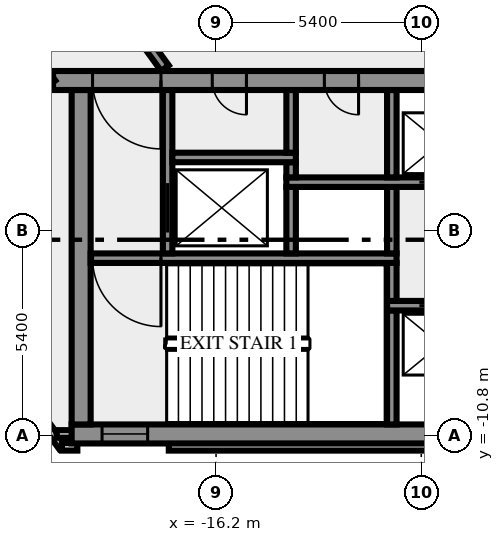
"""IFC4 building model, lengths in metres.
Left out: names, types, materials, properties, quantities, classifications, styles, units other than length and angle.
Written with IfcOpenShell. Run it as: python <this file> out.ifc"""

import sys

from ifc_helpers import new_model, si_unit, direction, frame, frame_2d, origin, place, context, subcontext, project, spatial, rectangle, extrude, element, fill, save


model = new_model("IFC4")
c1 = context("Model", 3, precision=1e-05, world=origin(), true_north=direction((0.0, 1.0)))
c2 = subcontext(c1, "Body", "Model", "MODEL_VIEW")
j1 = project(units=[si_unit("LENGTHUNIT", "METRE"), si_unit("PLANEANGLEUNIT", "RADIAN")], contexts=[c1])
p1 = place(None, origin())
s1 = spatial("IfcSite", under=j1, at=p1, CompositionType="ELEMENT")
p2 = place(p1, origin())
s2 = spatial("IfcBuilding", under=s1, at=p2, CompositionType="ELEMENT")
p3 = place(p2, frame((0.0, 0.0, 129.0)))
s3 = spatial("IfcBuildingStorey", under=s2, at=p3, CompositionType="ELEMENT", Elevation=129.0)
p4 = place(p3, frame((-21.833, -8.909, 0.0), z_axis=(0.0, 0.0, 1.0), x_axis=(0.587766567315, -0.809030569476, 0.0)))
e1 = element("IfcWall", 1, at=p4, inside=s3, PredefinedType="SOLIDWALL", context=c2, shape_type="SweptSolid", body=[
    extrude(rectangle(XDim=2.688, YDim=0.2, at=frame_2d((1.344, 0.0))), origin(), (0.0, 0.0, 1.0), 3.4),
])
p5 = place(p3, frame((-20.256, -11.088, 0.0), z_axis=(0.0, 0.0, 1.0), x_axis=(1.0, 0.0, 0.0)))
e2 = element("IfcWall", 2, at=p5, inside=s3, PredefinedType="SOLIDWALL", context=c2, shape_type="SweptSolid", body=[
    extrude(rectangle(XDim=0.406, YDim=0.2, at=frame_2d((0.203, 0.0))), origin(), (0.0, 0.0, 1.0), 3.4),
])
p6 = place(p3, frame((-17.444, -11.088, 0.0), z_axis=(0.0, 0.0, 1.0), x_axis=(1.0, 0.0, 0.0)))
e3 = element("IfcWall", 3, at=p6, inside=s3, PredefinedType="SOLIDWALL", context=c2, shape_type="SweptSolid", body=[
    extrude(rectangle(XDim=34.888, YDim=0.2, at=frame_2d((17.444, 0.0))), origin(), (0.0, 0.0, 1.0), 3.4),
])
p7 = place(p3, frame((-19.98, -10.75, 0.0), z_axis=(0.0, 0.0, 1.0), x_axis=(-1.0, 0.0, 0.0)))
e4 = element("IfcWall", 4, at=p7, inside=s3, PredefinedType="SOLIDWALL", context=c2, shape_type="SweptSolid", body=[
    extrude(rectangle(XDim=0.417, YDim=0.2, at=frame_2d((0.208, 0.0))), origin(), (0.0, 0.0, 1.0), 3.4),
])
p8 = place(p3, frame((-20.0, -10.75, 0.0), z_axis=(0.0, 0.0, 1.0), x_axis=(1.0, 0.0, 0.0)))
e5 = element("IfcWall", 5, at=p8, inside=s3, PredefinedType="SHEAR", context=c2, shape_type="SweptSolid", body=[
    extrude(rectangle(XDim=40.0, YDim=0.5, at=frame_2d((20.0, 0.0))), origin(), (0.0, 0.0, 1.0), 3.4),
])
p9 = place(p8, frame((0.8, 0.0, 1.0)))
e6 = element("IfcOpeningElement", 6, at=p9, cuts=e5, PredefinedType="OPENING", context=c2, shape_type="SweptSolid", body=[
    extrude(rectangle(XDim=1.2, YDim=1.2, at=frame_2d((0.6, 0.6))), frame((0.0, 0.26, 0.0), z_axis=(0.0, -1.0, 0.0), x_axis=(1.0, 0.0, 0.0)), (0.0, 0.0, 1.0), 0.52),
])
p10 = place(p8, frame((38.0, 0.0, 1.0)))
e7 = element("IfcOpeningElement", 7, at=p10, cuts=e5, PredefinedType="OPENING", context=c2, shape_type="SweptSolid", body=[
    extrude(rectangle(XDim=1.2, YDim=1.2, at=frame_2d((0.6, 0.6))), frame((0.0, 0.26, 0.0), z_axis=(0.0, -1.0, 0.0), x_axis=(1.0, 0.0, 0.0)), (0.0, 0.0, 1.0), 0.52),
])
p11 = place(p3, frame((-19.75, -10.5, 0.0), z_axis=(0.0, 0.0, 1.0), x_axis=(0.0, 1.0, 0.0)))
e8 = element("IfcWall", 8, at=p11, inside=s3, PredefinedType="SHEAR", context=c2, shape_type="SweptSolid", body=[
    extrude(rectangle(XDim=8.8, YDim=0.5, at=frame_2d((4.4, 0.0))), origin(), (0.0, 0.0, 1.0), 3.4),
])
p12 = place(p3, frame((-11.575, -10.5, 0.0), z_axis=(0.0, 0.0, 1.0), x_axis=(0.0, 1.0, 0.0)))
e9 = element("IfcWall", 9, at=p12, inside=s3, PredefinedType="SHEAR", context=c2, shape_type="SweptSolid", body=[
    extrude(rectangle(XDim=3.0, YDim=0.25, at=frame_2d((1.5, 0.0))), origin(), (0.0, 0.0, 1.0), 3.4),
])
p13 = place(p3, frame((11.7, -7.375, 0.0), z_axis=(0.0, 0.0, 1.0), x_axis=(-1.0, 0.0, 0.0)))
e10 = element("IfcWall", 10, at=p13, inside=s3, PredefinedType="SHEAR", context=c2, shape_type="SweptSolid", body=[
    extrude(rectangle(XDim=23.4, YDim=0.25, at=frame_2d((11.7, 0.0))), origin(), (0.0, 0.0, 1.0), 3.4),
])
p14 = place(p13, frame((21.45, 0.0, 0.0)))
e11 = element("IfcOpeningElement", 11, at=p14, cuts=e10, PredefinedType="OPENING", context=c2, shape_type="SweptSolid", body=[
    extrude(rectangle(XDim=1.1, YDim=2.1, at=frame_2d((0.55, 1.05))), frame((0.0, 0.135, 0.0), z_axis=(0.0, -1.0, 0.0), x_axis=(1.0, 0.0, 0.0)), (0.0, 0.0, 1.0), 0.27),
])
p15 = place(p13, frame((18.95, 0.0, 0.0)))
e12 = element("IfcOpeningElement", 12, at=p15, cuts=e10, PredefinedType="OPENING", context=c2, shape_type="SweptSolid", body=[
    extrude(rectangle(XDim=1.1, YDim=2.1, at=frame_2d((0.55, 1.05))), frame((0.0, 0.135, 0.0), z_axis=(0.0, -1.0, 0.0), x_axis=(1.0, 0.0, 0.0)), (0.0, 0.0, 1.0), 0.27),
])
p16 = place(p13, frame((16.45, 0.0, 0.0)))
e13 = element("IfcOpeningElement", 13, at=p16, cuts=e10, PredefinedType="OPENING", context=c2, shape_type="SweptSolid", body=[
    extrude(rectangle(XDim=1.1, YDim=2.1, at=frame_2d((0.55, 1.05))), frame((0.0, 0.135, 0.0), z_axis=(0.0, -1.0, 0.0), x_axis=(1.0, 0.0, 0.0)), (0.0, 0.0, 1.0), 0.27),
])
p17 = place(p13, frame((14.75, 0.0, 0.0)))
e14 = element("IfcOpeningElement", 14, at=p17, cuts=e10, PredefinedType="OPENING", context=c2, shape_type="SweptSolid", body=[
    extrude(rectangle(XDim=0.7, YDim=2.1, at=frame_2d((0.35, 1.05))), frame((0.0, 0.135, 0.0), z_axis=(0.0, -1.0, 0.0), x_axis=(1.0, 0.0, 0.0)), (0.0, 0.0, 1.0), 0.27),
])
p18 = place(p13, frame((13.35, 0.0, 0.0)))
e15 = element("IfcOpeningElement", 15, at=p18, cuts=e10, PredefinedType="OPENING", context=c2, shape_type="SweptSolid", body=[
    extrude(rectangle(XDim=0.9, YDim=2.1, at=frame_2d((0.45, 1.05))), frame((0.0, 0.135, 0.0), z_axis=(0.0, -1.0, 0.0), x_axis=(1.0, 0.0, 0.0)), (0.0, 0.0, 1.0), 0.27),
])
p19 = place(p13, frame((11.975, 0.0, 0.0)))
e16 = element("IfcOpeningElement", 16, at=p19, cuts=e10, PredefinedType="OPENING", context=c2, shape_type="SweptSolid", body=[
    extrude(rectangle(XDim=0.9, YDim=2.1, at=frame_2d((0.45, 1.05))), frame((0.0, 0.135, 0.0), z_axis=(0.0, -1.0, 0.0), x_axis=(1.0, 0.0, 0.0)), (0.0, 0.0, 1.0), 0.27),
])
p20 = place(p13, frame((10.5, 0.0, 0.0)))
e17 = element("IfcOpeningElement", 17, at=p20, cuts=e10, PredefinedType="OPENING", context=c2, shape_type="SweptSolid", body=[
    extrude(rectangle(XDim=0.9, YDim=2.1, at=frame_2d((0.45, 1.05))), frame((0.0, 0.135, 0.0), z_axis=(0.0, -1.0, 0.0), x_axis=(1.0, 0.0, 0.0)), (0.0, 0.0, 1.0), 0.27),
])
p21 = place(p3, frame((-11.575, -7.25, 0.0), z_axis=(0.0, 0.0, 1.0), x_axis=(0.0, 1.0, 0.0)))
e18 = element("IfcWall", 18, at=p21, inside=s3, PredefinedType="SHEAR", context=c2, shape_type="SweptSolid", body=[
    extrude(rectangle(XDim=1.0, YDim=0.25, at=frame_2d((0.5, 0.0))), origin(), (0.0, 0.0, 1.0), 3.4),
])
p22 = place(p3, frame((-11.45, -6.125, 0.0), z_axis=(0.0, 0.0, 1.0), x_axis=(-1.0, 0.0, 0.0)))
e19 = element("IfcWall", 19, at=p22, inside=s3, PredefinedType="SHEAR", context=c2, shape_type="SweptSolid", body=[
    extrude(rectangle(XDim=8.05, YDim=0.25, at=frame_2d((4.025, 0.0))), origin(), (0.0, 0.0, 1.0), 3.4),
])
p23 = place(p22, frame((6.2, 0.0, 0.0)))
e20 = element("IfcOpeningElement", 20, at=p23, cuts=e19, PredefinedType="OPENING", context=c2, shape_type="SweptSolid", body=[
    extrude(rectangle(XDim=1.8, YDim=2.1, at=frame_2d((0.9, 1.05))), frame((0.0, 0.135, 0.0), z_axis=(0.0, -1.0, 0.0), x_axis=(1.0, 0.0, 0.0)), (0.0, 0.0, 1.0), 0.27),
])
p24 = place(p3, frame((-17.475, -6.0, 0.0), z_axis=(0.0, 0.0, 1.0), x_axis=(0.0, 1.0, 0.0)))
e21 = element("IfcWall", 21, at=p24, inside=s3, PredefinedType="SHEAR", context=c2, shape_type="SweptSolid", body=[
    extrude(rectangle(XDim=4.3, YDim=0.25, at=frame_2d((2.15, 0.0))), origin(), (0.0, 0.0, 1.0), 3.4),
])
p25 = place(p24, frame((0.55, 0.0, 0.0)))
e22 = element("IfcOpeningElement", 22, at=p25, cuts=e21, PredefinedType="OPENING", context=c2, shape_type="SweptSolid", body=[
    extrude(rectangle(XDim=1.3, YDim=2.1, at=frame_2d((0.65, 1.05))), frame((0.0, 0.135, 0.0), z_axis=(0.0, -1.0, 0.0), x_axis=(1.0, 0.0, 0.0)), (0.0, 0.0, 1.0), 0.27),
])
for number, where, z_axis, x_axis in (
    (23, (-14.225, -6.0, 0.0), (0.0, 0.0, 1.0), (0.0, 1.0, 0.0)),
    (24, (-11.575, -6.0, 0.0), (0.0, 0.0, 1.0), (0.0, 1.0, 0.0)),
):
    element("IfcWall", number, at=place(p3, frame(where, z_axis=z_axis, x_axis=x_axis)), inside=s3, PredefinedType="SHEAR", context=c2, shape_type="SweptSolid", body=[
        extrude(rectangle(XDim=1.75, YDim=0.25, at=frame_2d((0.875, 0.0))), origin(), (0.0, 0.0, 1.0), 3.4),
    ])
p26 = place(p3, frame((-14.35, -4.125, 0.0), z_axis=(0.0, 0.0, 1.0), x_axis=(1.0, 0.0, 0.0)))
e25 = element("IfcWall", 25, at=p26, inside=s3, PredefinedType="SHEAR", context=c2, shape_type="SweptSolid", body=[
    extrude(rectangle(XDim=12.7, YDim=0.25, at=frame_2d((6.35, 0.0))), origin(), (0.0, 0.0, 1.0), 3.4),
])
p27 = place(p26, frame((3.5, 0.0, 0.0)))
e26 = element("IfcOpeningElement", 26, at=p27, cuts=e25, PredefinedType="OPENING", context=c2, shape_type="SweptSolid", body=[
    extrude(rectangle(XDim=1.1, YDim=2.1, at=frame_2d((0.55, 1.05))), frame((0.0, 0.135, 0.0), z_axis=(0.0, -1.0, 0.0), x_axis=(1.0, 0.0, 0.0)), (0.0, 0.0, 1.0), 0.27),
])
p28 = place(p26, frame((6.0, 0.0, 0.0)))
e27 = element("IfcOpeningElement", 27, at=p28, cuts=e25, PredefinedType="OPENING", context=c2, shape_type="SweptSolid", body=[
    extrude(rectangle(XDim=1.1, YDim=2.1, at=frame_2d((0.55, 1.05))), frame((0.0, 0.135, 0.0), z_axis=(0.0, -1.0, 0.0), x_axis=(1.0, 0.0, 0.0)), (0.0, 0.0, 1.0), 0.27),
])
p29 = place(p26, frame((8.5, 0.0, 0.0)))
e28 = element("IfcOpeningElement", 28, at=p29, cuts=e25, PredefinedType="OPENING", context=c2, shape_type="SweptSolid", body=[
    extrude(rectangle(XDim=1.1, YDim=2.1, at=frame_2d((0.55, 1.05))), frame((0.0, 0.135, 0.0), z_axis=(0.0, -1.0, 0.0), x_axis=(1.0, 0.0, 0.0)), (0.0, 0.0, 1.0), 0.27),
])
p30 = place(p3, frame((-14.225, -4.0, 0.0), z_axis=(0.0, 0.0, 1.0), x_axis=(0.0, 1.0, 0.0)))
e29 = element("IfcWall", 29, at=p30, inside=s3, PredefinedType="SHEAR", context=c2, shape_type="SweptSolid", body=[
    extrude(rectangle(XDim=0.4, YDim=0.25, at=frame_2d((0.2, 0.0))), origin(), (0.0, 0.0, 1.0), 3.4),
])
p31 = place(p3, frame((-11.575, -4.0, 0.0), z_axis=(0.0, 0.0, 1.0), x_axis=(0.0, 1.0, 0.0)))
e30 = element("IfcWall", 30, at=p31, inside=s3, PredefinedType="SHEAR", context=c2, shape_type="SweptSolid", body=[
    extrude(rectangle(XDim=2.3, YDim=0.25, at=frame_2d((1.15, 0.0))), origin(), (0.0, 0.0, 1.0), 3.4),
])
p32 = place(p3, frame((-17.35, -3.475, 0.0), z_axis=(0.0, 0.0, 1.0), x_axis=(1.0, 0.0, 0.0)))
e31 = element("IfcWall", 31, at=p32, inside=s3, PredefinedType="SHEAR", context=c2, shape_type="SweptSolid", body=[
    extrude(rectangle(XDim=3.25, YDim=0.25, at=frame_2d((1.625, 0.0))), origin(), (0.0, 0.0, 1.0), 3.4),
])
p33 = place(p3, frame((-14.225, -3.35, 0.0), z_axis=(0.0, 0.0, 1.0), x_axis=(0.0, 1.0, 0.0)))
e32 = element("IfcWall", 32, at=p33, inside=s3, PredefinedType="SHEAR", context=c2, shape_type="SweptSolid", body=[
    extrude(rectangle(XDim=1.65, YDim=0.25, at=frame_2d((0.825, 0.0))), origin(), (0.0, 0.0, 1.0), 3.4),
])
p34 = place(p3, frame((20.49, -1.45, 0.0), z_axis=(0.0, 0.0, 1.0), x_axis=(-1.0, 0.0, 0.0)))
e33 = element("IfcWall", 33, at=p34, inside=s3, PredefinedType="SHEAR", context=c2, shape_type="SweptSolid", body=[
    extrude(rectangle(XDim=40.98, YDim=0.5, at=frame_2d((20.49, 0.0))), origin(), (0.0, 0.0, 1.0), 3.4),
])
p35 = place(p34, frame((38.14, 0.0, 0.0)))
e34 = element("IfcOpeningElement", 34, at=p35, cuts=e33, PredefinedType="OPENING", context=c2, shape_type="SweptSolid", body=[
    extrude(rectangle(XDim=1.8, YDim=2.1, at=frame_2d((0.9, 1.05))), frame((0.0, 0.26, 0.0), z_axis=(0.0, -1.0, 0.0), x_axis=(1.0, 0.0, 0.0)), (0.0, 0.0, 1.0), 0.52),
])
p36 = place(p34, frame((35.89, 0.0, 0.0)))
e35 = element("IfcOpeningElement", 35, at=p36, cuts=e33, PredefinedType="OPENING", context=c2, shape_type="SweptSolid", body=[
    extrude(rectangle(XDim=0.9, YDim=2.1, at=frame_2d((0.45, 1.05))), frame((0.0, 0.26, 0.0), z_axis=(0.0, -1.0, 0.0), x_axis=(1.0, 0.0, 0.0)), (0.0, 0.0, 1.0), 0.52),
])
p37 = place(p34, frame((32.94, 0.0, 0.0)))
e36 = element("IfcOpeningElement", 36, at=p37, cuts=e33, PredefinedType="OPENING", context=c2, shape_type="SweptSolid", body=[
    extrude(rectangle(XDim=0.9, YDim=2.1, at=frame_2d((0.45, 1.05))), frame((0.0, 0.26, 0.0), z_axis=(0.0, -1.0, 0.0), x_axis=(1.0, 0.0, 0.0)), (0.0, 0.0, 1.0), 0.52),
])
p38 = place(p34, frame((19.59, 0.0, 0.0)))
e37 = element("IfcOpeningElement", 37, at=p38, cuts=e33, PredefinedType="OPENING", context=c2, shape_type="SweptSolid", body=[
    extrude(rectangle(XDim=2.0, YDim=2.1, at=frame_2d((1.0, 1.05))), frame((0.0, 0.26, 0.0), z_axis=(0.0, -1.0, 0.0), x_axis=(1.0, 0.0, 0.0)), (0.0, 0.0, 1.0), 0.52),
])
p39 = place(p34, frame((7.14, 0.0, 0.0)))
e38 = element("IfcOpeningElement", 38, at=p39, cuts=e33, PredefinedType="OPENING", context=c2, shape_type="SweptSolid", body=[
    extrude(rectangle(XDim=0.9, YDim=2.1, at=frame_2d((0.45, 1.05))), frame((0.0, 0.26, 0.0), z_axis=(0.0, -1.0, 0.0), x_axis=(1.0, 0.0, 0.0)), (0.0, 0.0, 1.0), 0.52),
])
p40 = place(p34, frame((5.028, 0.0, 0.0)))
e39 = element("IfcOpeningElement", 39, at=p40, cuts=e33, PredefinedType="OPENING", context=c2, shape_type="SweptSolid", body=[
    extrude(rectangle(XDim=0.8, YDim=2.1, at=frame_2d((0.4, 1.05))), frame((0.0, 0.26, 0.0), z_axis=(0.0, -1.0, 0.0), x_axis=(1.0, 0.0, 0.0)), (0.0, 0.0, 1.0), 0.52),
])
p41 = place(p34, frame((3.452, 0.0, 0.0)))
e40 = element("IfcOpeningElement", 40, at=p41, cuts=e33, PredefinedType="OPENING", context=c2, shape_type="SweptSolid", body=[
    extrude(rectangle(XDim=0.8, YDim=2.1, at=frame_2d((0.4, 1.05))), frame((0.0, 0.26, 0.0), z_axis=(0.0, -1.0, 0.0), x_axis=(1.0, 0.0, 0.0)), (0.0, 0.0, 1.0), 0.52),
])
p42 = place(p34, frame((1.04, 0.0, 0.0)))
e41 = element("IfcOpeningElement", 41, at=p42, cuts=e33, PredefinedType="OPENING", context=c2, shape_type="SweptSolid", body=[
    extrude(rectangle(XDim=1.8, YDim=2.1, at=frame_2d((0.9, 1.05))), frame((0.0, 0.26, 0.0), z_axis=(0.0, -1.0, 0.0), x_axis=(1.0, 0.0, 0.0)), (0.0, 0.0, 1.0), 0.52),
])
p43 = place(p3, frame((-20.531, -1.523, 0.0), z_axis=(0.0, 0.0, 1.0), x_axis=(-0.587784522481, 0.809017524614, 0.0)))
e42 = element("IfcWall", 42, at=p43, inside=s3, PredefinedType="SOLIDWALL", context=c2, shape_type="SweptSolid", body=[
    extrude(rectangle(XDim=49.912, YDim=0.25, at=frame_2d((24.956, 0.0))), origin(), (0.0, 0.0, 1.0), 3.4),
])
p44 = place(p43, frame((34.816, 0.0, 0.0)))
e43 = element("IfcOpeningElement", 43, at=p44, cuts=e42, PredefinedType="OPENING", context=c2, shape_type="SweptSolid", body=[
    extrude(rectangle(XDim=0.9, YDim=2.1, at=frame_2d((0.45, 1.05))), frame((0.0, 0.135, 0.0), z_axis=(0.0, -1.0, 0.0), x_axis=(1.0, 0.0, 0.0)), (0.0, 0.0, 1.0), 0.27),
])
p45 = place(p43, frame((33.215, 0.0, 0.0)))
e44 = element("IfcOpeningElement", 44, at=p45, cuts=e42, PredefinedType="OPENING", context=c2, shape_type="SweptSolid", body=[
    extrude(rectangle(XDim=0.9, YDim=2.1, at=frame_2d((0.45, 1.05))), frame((0.0, 0.135, 0.0), z_axis=(0.0, -1.0, 0.0), x_axis=(1.0, 0.0, 0.0)), (0.0, 0.0, 1.0), 0.27),
])
p46 = place(p43, frame((22.916, 0.0, 0.0)))
e45 = element("IfcOpeningElement", 45, at=p46, cuts=e42, PredefinedType="OPENING", context=c2, shape_type="SweptSolid", body=[
    extrude(rectangle(XDim=1.8, YDim=2.1, at=frame_2d((0.9, 1.05))), frame((0.0, 0.135, 0.0), z_axis=(0.0, -1.0, 0.0), x_axis=(1.0, 0.0, 0.0)), (0.0, 0.0, 1.0), 0.27),
])
p47 = place(p43, frame((0.483, 0.0, 0.0)))
e46 = element("IfcOpeningElement", 46, at=p47, cuts=e42, PredefinedType="OPENING", context=c2, shape_type="SweptSolid", body=[
    extrude(rectangle(XDim=1.8, YDim=2.1, at=frame_2d((0.9, 1.05))), frame((0.0, 0.135, 0.0), z_axis=(0.0, -1.0, 0.0), x_axis=(1.0, 0.0, 0.0)), (0.0, 0.0, 1.0), 0.27),
])
p48 = place(p43, frame((25.365, 0.0, 0.0)))
e47 = element("IfcOpeningElement", 47, at=p48, cuts=e42, PredefinedType="OPENING", context=c2, shape_type="SweptSolid", body=[
    extrude(rectangle(XDim=0.9, YDim=2.1, at=frame_2d((0.45, 1.05))), frame((0.0, 0.135, 0.0), z_axis=(0.0, -1.0, 0.0), x_axis=(1.0, 0.0, 0.0)), (0.0, 0.0, 1.0), 0.27),
])
p49 = place(p3, frame((-37.232, 25.972, 0.0), z_axis=(0.0, 0.0, 1.0), x_axis=(0.587786323093, -0.809016216391, 0.0)))
e48 = element("IfcWall", 48, at=p49, inside=s3, PredefinedType="SOLIDWALL", context=c2, shape_type="SweptSolid", body=[
    extrude(rectangle(XDim=33.493, YDim=0.25, at=frame_2d((16.747, 0.0))), origin(), (0.0, 0.0, 1.0), 3.4),
])
p50 = place(p49, frame((9.785, 0.0, 0.0)))
e49 = element("IfcOpeningElement", 49, at=p50, cuts=e48, PredefinedType="OPENING", context=c2, shape_type="SweptSolid", body=[
    extrude(rectangle(XDim=1.8, YDim=2.1, at=frame_2d((0.9, 1.05))), frame((0.0, 0.135, 0.0), z_axis=(0.0, -1.0, 0.0), x_axis=(1.0, 0.0, 0.0)), (0.0, 0.0, 1.0), 0.27),
])
p51 = place(p49, frame((29.152, 0.0, 0.0)))
e50 = element("IfcOpeningElement", 50, at=p51, cuts=e48, PredefinedType="OPENING", context=c2, shape_type="SweptSolid", body=[
    extrude(rectangle(XDim=0.9, YDim=2.1, at=frame_2d((0.45, 1.05))), frame((0.0, 0.135, 0.0), z_axis=(0.0, -1.0, 0.0), x_axis=(1.0, 0.0, 0.0)), (0.0, 0.0, 1.0), 0.27),
])
p52 = place(p49, frame((1.335, 0.0, 0.0)))
e51 = element("IfcOpeningElement", 51, at=p52, cuts=e48, PredefinedType="OPENING", context=c2, shape_type="SweptSolid", body=[
    extrude(rectangle(XDim=0.9, YDim=2.1, at=frame_2d((0.45, 1.05))), frame((0.0, 0.135, 0.0), z_axis=(0.0, -1.0, 0.0), x_axis=(1.0, 0.0, 0.0)), (0.0, 0.0, 1.0), 0.27),
])
p53 = place(p9, origin())
e52 = element("IfcWindow", 52, at=p53, inside=s3, PartitioningType="SINGLE_PANEL", PredefinedType="WINDOW", context=c2, shape_type="SweptSolid", body=[
    extrude(rectangle(XDim=1.2, YDim=1.2, at=frame_2d((0.6, 0.6))), frame((0.0, 0.03, 0.0), z_axis=(0.0, -1.0, 0.0), x_axis=(1.0, 0.0, 0.0)), (0.0, 0.0, 1.0), 0.06),
])
fill(e6, e52)
p54 = place(p14, origin())
e53 = element("IfcDoor", 53, at=p54, inside=s3, OperationType="DOUBLE_DOOR_SLIDING", PredefinedType="DOOR", context=c2, shape_type="SweptSolid", body=[
    extrude(rectangle(XDim=1.1, YDim=2.1, at=frame_2d((0.55, 1.05))), frame((0.0, 0.025, 0.0), z_axis=(0.0, -1.0, 0.0), x_axis=(1.0, 0.0, 0.0)), (0.0, 0.0, 1.0), 0.05),
])
fill(e11, e53)
p55 = place(p23, origin())
e54 = element("IfcDoor", 54, at=p55, inside=s3, OperationType="DOUBLE_DOOR_SINGLE_SWING", PredefinedType="DOOR", context=c2, shape_type="SweptSolid", body=[
    extrude(rectangle(XDim=1.8, YDim=2.1, at=frame_2d((0.9, 1.05))), frame((0.0, 0.025, 0.0), z_axis=(0.0, -1.0, 0.0), x_axis=(1.0, 0.0, 0.0)), (0.0, 0.0, 1.0), 0.05),
])
fill(e20, e54)
p56 = place(p25, origin())
e55 = element("IfcDoor", 55, at=p56, inside=s3, OperationType="DOUBLE_DOOR_SLIDING", PredefinedType="DOOR", context=c2, shape_type="SweptSolid", body=[
    extrude(rectangle(XDim=1.3, YDim=2.1, at=frame_2d((0.65, 1.05))), frame((0.0, 0.025, 0.0), z_axis=(0.0, -1.0, 0.0), x_axis=(1.0, 0.0, 0.0)), (0.0, 0.0, 1.0), 0.05),
])
fill(e22, e55)
p57 = place(p27, origin())
e56 = element("IfcDoor", 56, at=p57, inside=s3, OperationType="DOUBLE_DOOR_SLIDING", PredefinedType="DOOR", context=c2, shape_type="SweptSolid", body=[
    extrude(rectangle(XDim=1.1, YDim=2.1, at=frame_2d((0.55, 1.05))), frame((0.0, 0.025, 0.0), z_axis=(0.0, -1.0, 0.0), x_axis=(1.0, 0.0, 0.0)), (0.0, 0.0, 1.0), 0.05),
])
fill(e26, e56)
p58 = place(p35, origin())
e57 = element("IfcDoor", 57, at=p58, inside=s3, OperationType="DOUBLE_DOOR_SINGLE_SWING", PredefinedType="DOOR", context=c2, shape_type="SweptSolid", body=[
    extrude(rectangle(XDim=1.8, YDim=2.1, at=frame_2d((0.9, 1.05))), frame((0.0, 0.025, 0.0), z_axis=(0.0, -1.0, 0.0), x_axis=(1.0, 0.0, 0.0)), (0.0, 0.0, 1.0), 0.05),
])
fill(e34, e57)
p59 = place(p36, origin())
e58 = element("IfcDoor", 58, at=p59, inside=s3, OperationType="SINGLE_SWING_RIGHT", PredefinedType="DOOR", context=c2, shape_type="SweptSolid", body=[
    extrude(rectangle(XDim=0.9, YDim=2.1, at=frame_2d((0.45, 1.05))), frame((0.0, 0.025, 0.0), z_axis=(0.0, -1.0, 0.0), x_axis=(1.0, 0.0, 0.0)), (0.0, 0.0, 1.0), 0.05),
])
fill(e35, e58)
p60 = place(p37, origin())
e59 = element("IfcDoor", 59, at=p60, inside=s3, OperationType="SINGLE_SWING_RIGHT", PredefinedType="DOOR", context=c2, shape_type="SweptSolid", body=[
    extrude(rectangle(XDim=0.9, YDim=2.1, at=frame_2d((0.45, 1.05))), frame((0.0, 0.025, 0.0), z_axis=(0.0, -1.0, 0.0), x_axis=(1.0, 0.0, 0.0)), (0.0, 0.0, 1.0), 0.05),
])
fill(e36, e59)
save(model, sys.argv[1])
